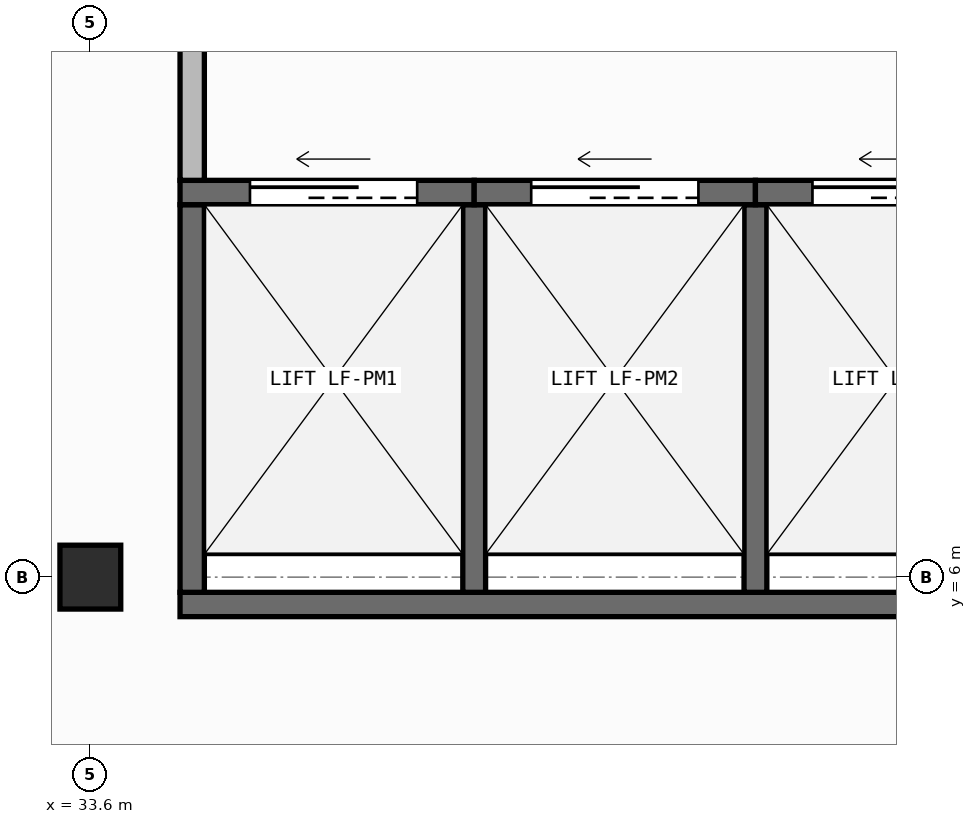
"""IFC4 building model, lengths in metres.
Left out: names, types, materials, properties, quantities, classifications, styles, units other than length and angle.
Written with IfcOpenShell. Run it as: python <this file> out.ifc"""

import sys

from ifc_helpers import new_model, si_unit, direction, frame, frame_2d, origin, origin_2d, place, context, subcontext, project, spatial, rectangle, i_section, extrude, element, fill, save


model = new_model("IFC4")
c1 = context("Model", 3, precision=1e-05, world=origin(), true_north=direction((0.0, 1.0)))
c2 = subcontext(c1, "Body", "Model", "MODEL_VIEW")
j1 = project(units=[si_unit("LENGTHUNIT", "METRE"), si_unit("PLANEANGLEUNIT", "RADIAN")], contexts=[c1])
p1 = place(None, origin())
s1 = spatial("IfcSite", under=j1, at=p1, CompositionType="ELEMENT")
p2 = place(p1, origin())
s2 = spatial("IfcBuilding", under=s1, at=p2, CompositionType="ELEMENT")
p3 = place(p2, origin())
s3 = spatial("IfcBuildingStorey", under=s2, at=p3, CompositionType="ELEMENT", Elevation=0.0)
p4 = place(p3, frame((33.6, 6.0, 0.0), z_axis=(0.0, 0.0, 1.0), x_axis=(1.0, 0.0, 0.0)))
e1 = element("IfcColumn", 1, at=p4, inside=s3, PredefinedType="COLUMN", context=c2, shape_type="SweptSolid", body=[
    extrude(i_section(OverallWidth=0.4, OverallDepth=0.42, WebThickness=0.025, FlangeThickness=0.04, at=origin_2d()), origin(), (0.0, 0.0, 1.0), 4.5),
])
p5 = place(p3, frame((34.19, 5.82, 0.0), z_axis=(0.0, 0.0, 1.0), x_axis=(1.0, 0.0, 0.0)))
e2 = element("IfcWall", 2, at=p5, inside=s3, PredefinedType="SHEAR", context=c2, shape_type="SweptSolid", body=[
    extrude(rectangle(XDim=5.72, YDim=0.16, at=frame_2d((2.86, 0.0))), origin(), (0.0, 0.0, 1.0), 4.25),
])
p6 = place(p3, frame((34.27, 5.9, 0.0), z_axis=(0.0, 0.0, 1.0), x_axis=(0.0, 1.0, 0.0)))
e3 = element("IfcWall", 3, at=p6, inside=s3, PredefinedType="SHEAR", context=c2, shape_type="SweptSolid", body=[
    extrude(rectangle(XDim=2.55, YDim=0.16, at=frame_2d((1.275, 0.0))), origin(), (0.0, 0.0, 1.0), 4.25),
])
for number, where, z_axis, x_axis in (
    (4, (36.125, 5.9, 0.0), (0.0, 0.0, 1.0), (0.0, 1.0, 0.0)),
    (5, (37.975, 5.9, 0.0), (0.0, 0.0, 1.0), (0.0, 1.0, 0.0)),
):
    element("IfcWall", number, at=place(p3, frame(where, z_axis=z_axis, x_axis=x_axis)), inside=s3, PredefinedType="SHEAR", context=c2, shape_type="SweptSolid", body=[
        extrude(rectangle(XDim=2.55, YDim=0.15, at=frame_2d((1.275, 0.0))), origin(), (0.0, 0.0, 1.0), 4.25),
    ])
p7 = place(p3, frame((34.19, 8.53, 0.0), z_axis=(0.0, 0.0, 1.0), x_axis=(1.0, 0.0, 0.0)))
e6 = element("IfcWall", 6, at=p7, inside=s3, PredefinedType="SHEAR", context=c2, shape_type="SweptSolid", body=[
    extrude(rectangle(XDim=1.935, YDim=0.16, at=frame_2d((0.968, 0.0))), origin(), (0.0, 0.0, 1.0), 4.25),
])
p8 = place(p7, frame((0.46, 0.0, 0.0)))
e7 = element("IfcOpeningElement", 7, at=p8, cuts=e6, PredefinedType="OPENING", context=c2, shape_type="SweptSolid", body=[
    extrude(rectangle(XDim=1.1, YDim=2.15, at=frame_2d((0.55, 1.075))), frame((0.0, 0.09, 0.0), z_axis=(0.0, -1.0, 0.0), x_axis=(1.0, 0.0, 0.0)), (0.0, 0.0, 1.0), 0.18),
])
p9 = place(p3, frame((36.125, 8.53, 0.0), z_axis=(0.0, 0.0, 1.0), x_axis=(1.0, 0.0, 0.0)))
e8 = element("IfcWall", 8, at=p9, inside=s3, PredefinedType="SHEAR", context=c2, shape_type="SweptSolid", body=[
    extrude(rectangle(XDim=1.85, YDim=0.16, at=frame_2d((0.925, 0.0))), origin(), (0.0, 0.0, 1.0), 4.25),
])
p10 = place(p9, frame((0.375, 0.0, 0.0)))
e9 = element("IfcOpeningElement", 9, at=p10, cuts=e8, PredefinedType="OPENING", context=c2, shape_type="SweptSolid", body=[
    extrude(rectangle(XDim=1.1, YDim=2.15, at=frame_2d((0.55, 1.075))), frame((0.0, 0.09, 0.0), z_axis=(0.0, -1.0, 0.0), x_axis=(1.0, 0.0, 0.0)), (0.0, 0.0, 1.0), 0.18),
])
p11 = place(p3, frame((37.975, 8.53, 0.0), z_axis=(0.0, 0.0, 1.0), x_axis=(1.0, 0.0, 0.0)))
e10 = element("IfcWall", 10, at=p11, inside=s3, PredefinedType="SHEAR", context=c2, shape_type="SweptSolid", body=[
    extrude(rectangle(XDim=1.935, YDim=0.16, at=frame_2d((0.967, 0.0))), origin(), (0.0, 0.0, 1.0), 4.25),
])
p12 = place(p11, frame((0.375, 0.0, 0.0)))
e11 = element("IfcOpeningElement", 11, at=p12, cuts=e10, PredefinedType="OPENING", context=c2, shape_type="SweptSolid", body=[
    extrude(rectangle(XDim=1.1, YDim=2.15, at=frame_2d((0.55, 1.075))), frame((0.0, 0.09, 0.0), z_axis=(0.0, -1.0, 0.0), x_axis=(1.0, 0.0, 0.0)), (0.0, 0.0, 1.0), 0.18),
])
p13 = place(p3, frame((34.27, 8.61, 0.0), z_axis=(0.0, 0.0, 1.0), x_axis=(0.0, 1.0, 0.0)))
e12 = element("IfcWall", 12, at=p13, inside=s3, PredefinedType="PARTITIONING", context=c2, shape_type="SweptSolid", body=[
    extrude(rectangle(XDim=3.39, YDim=0.16, at=frame_2d((1.695, 0.0))), origin(), (0.0, 0.0, 1.0), 4.25),
])
p14 = place(p8, origin())
e13 = element("IfcDoor", 13, at=p14, inside=s3, OperationType="SLIDING_TO_LEFT", PredefinedType="DOOR", context=c2, shape_type="SweptSolid", body=[
    extrude(rectangle(XDim=1.1, YDim=2.15, at=frame_2d((0.55, 1.075))), frame((0.0, 0.025, 0.0), z_axis=(0.0, -1.0, 0.0), x_axis=(1.0, 0.0, 0.0)), (0.0, 0.0, 1.0), 0.05),
])
fill(e7, e13)
p15 = place(p10, origin())
e14 = element("IfcDoor", 14, at=p15, inside=s3, OperationType="SLIDING_TO_LEFT", PredefinedType="DOOR", context=c2, shape_type="SweptSolid", body=[
    extrude(rectangle(XDim=1.1, YDim=2.15, at=frame_2d((0.55, 1.075))), frame((0.0, 0.025, 0.0), z_axis=(0.0, -1.0, 0.0), x_axis=(1.0, 0.0, 0.0)), (0.0, 0.0, 1.0), 0.05),
])
fill(e9, e14)
p16 = place(p12, origin())
e15 = element("IfcDoor", 15, at=p16, inside=s3, OperationType="SLIDING_TO_LEFT", PredefinedType="DOOR", context=c2, shape_type="SweptSolid", body=[
    extrude(rectangle(XDim=1.1, YDim=2.15, at=frame_2d((0.55, 1.075))), frame((0.0, 0.025, 0.0), z_axis=(0.0, -1.0, 0.0), x_axis=(1.0, 0.0, 0.0)), (0.0, 0.0, 1.0), 0.05),
])
fill(e11, e15)
save(model, sys.argv[1])
